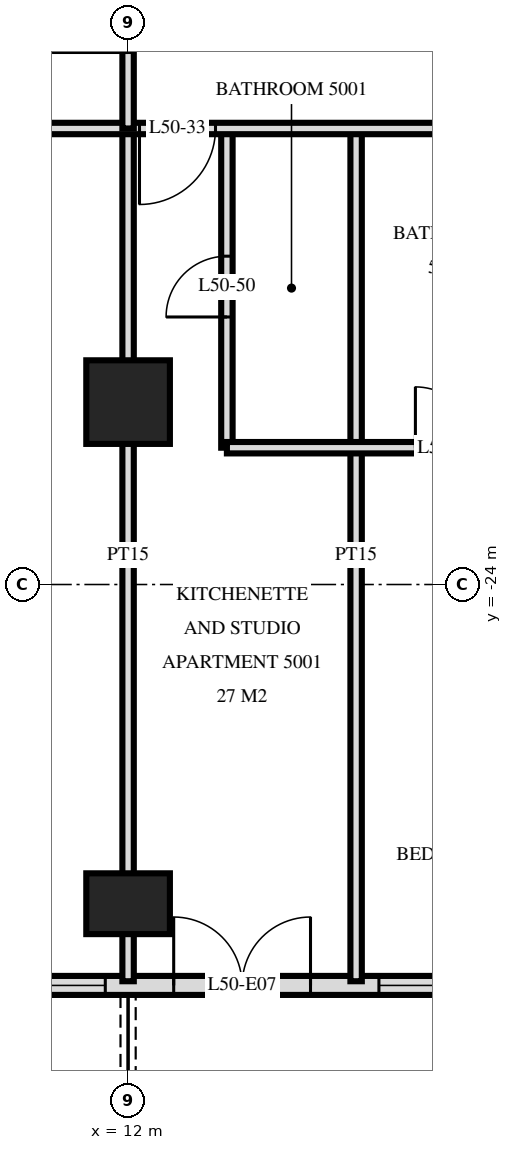
"""IFC4 building model, lengths in metres.
Left out: names, types, materials, properties, quantities, classifications, styles, units other than length and angle.
Written with IfcOpenShell. Run it as: python <this file> out.ifc"""

import sys

from ifc_helpers import new_model, si_unit, direction, frame, frame_2d, origin, origin_2d, place, context, subcontext, project, spatial, rectangle, extrude, element, fill, save


model = new_model("IFC4")
c1 = context("Model", 3, precision=1e-05, world=origin(), true_north=direction((0.0, 1.0)))
c2 = subcontext(c1, "Body", "Model", "MODEL_VIEW")
j1 = project(units=[si_unit("LENGTHUNIT", "METRE"), si_unit("PLANEANGLEUNIT", "RADIAN")], contexts=[c1])
p1 = place(None, origin())
s1 = spatial("IfcSite", under=j1, at=p1, CompositionType="ELEMENT")
p2 = place(p1, origin())
s2 = spatial("IfcBuilding", under=s1, at=p2, CompositionType="ELEMENT")
p3 = place(p2, frame((0.0, 0.0, 194.1)))
s3 = spatial("IfcBuildingStorey", under=s2, at=p3, CompositionType="ELEMENT", Elevation=194.1)
p4 = place(p3, frame((12.0, -28.2, 0.0), z_axis=(0.0, 0.0, 1.0), x_axis=(1.0, 0.0, 0.0)))
e1 = element("IfcColumn", 1, at=p4, inside=s3, PredefinedType="COLUMN", context=c2, shape_type="SweptSolid", body=[
    extrude(rectangle(XDim=1.1, YDim=0.8, at=origin_2d()), origin(), (0.0, 0.0, 1.0), 3.5),
])
p5 = place(p3, frame((12.0, -21.6, 0.0), z_axis=(0.0, 0.0, 1.0), x_axis=(1.0, 0.0, 0.0)))
e2 = element("IfcColumn", 2, at=p5, inside=s3, PredefinedType="COLUMN", context=c2, shape_type="SweptSolid", body=[
    extrude(rectangle(XDim=1.1, YDim=1.1, at=origin_2d()), origin(), (0.0, 0.0, 1.0), 3.5),
])
p6 = place(p3, frame((-22.475, -29.275, 0.0), z_axis=(0.0, 0.0, 1.0), x_axis=(1.0, 0.0, 0.0)))
e3 = element("IfcWall", 3, at=p6, inside=s3, PredefinedType="SOLIDWALL", context=c2, shape_type="SweptSolid", body=[
    extrude(rectangle(XDim=44.951, YDim=0.25, at=frame_2d((22.475, 0.0))), origin(), (0.0, 0.0, 1.0), 3.22),
])
p7 = place(p6, frame((0.575, 0.0, 0.0)))
e4 = element("IfcOpeningElement", 4, at=p7, cuts=e3, PredefinedType="OPENING", context=c2, shape_type="SweptSolid", body=[
    extrude(rectangle(XDim=1.8, YDim=2.4, at=frame_2d((0.9, 1.2))), frame((0.0, 0.135, 0.0), z_axis=(0.0, -1.0, 0.0), x_axis=(1.0, 0.0, 0.0)), (0.0, 0.0, 1.0), 0.27),
])
p8 = place(p6, frame((6.575, 0.0, 0.0)))
e5 = element("IfcOpeningElement", 5, at=p8, cuts=e3, PredefinedType="OPENING", context=c2, shape_type="SweptSolid", body=[
    extrude(rectangle(XDim=1.8, YDim=2.4, at=frame_2d((0.9, 1.2))), frame((0.0, 0.135, 0.0), z_axis=(0.0, -1.0, 0.0), x_axis=(1.0, 0.0, 0.0)), (0.0, 0.0, 1.0), 0.27),
])
p9 = place(p6, frame((11.075, 0.0, 0.0)))
e6 = element("IfcOpeningElement", 6, at=p9, cuts=e3, PredefinedType="OPENING", context=c2, shape_type="SweptSolid", body=[
    extrude(rectangle(XDim=1.8, YDim=2.4, at=frame_2d((0.9, 1.2))), frame((0.0, 0.135, 0.0), z_axis=(0.0, -1.0, 0.0), x_axis=(1.0, 0.0, 0.0)), (0.0, 0.0, 1.0), 0.27),
])
p10 = place(p6, frame((13.775, 0.0, 0.9)))
e7 = element("IfcOpeningElement", 7, at=p10, cuts=e3, PredefinedType="OPENING", context=c2, shape_type="SweptSolid", body=[
    extrude(rectangle(XDim=2.4, YDim=1.5, at=frame_2d((1.2, 0.75))), frame((0.0, 0.135, 0.0), z_axis=(0.0, -1.0, 0.0), x_axis=(1.0, 0.0, 0.0)), (0.0, 0.0, 1.0), 0.27),
])
p11 = place(p6, frame((16.775, 0.0, 0.9)))
e8 = element("IfcOpeningElement", 8, at=p11, cuts=e3, PredefinedType="OPENING", context=c2, shape_type="SweptSolid", body=[
    extrude(rectangle(XDim=2.4, YDim=1.5, at=frame_2d((1.2, 0.75))), frame((0.0, 0.135, 0.0), z_axis=(0.0, -1.0, 0.0), x_axis=(1.0, 0.0, 0.0)), (0.0, 0.0, 1.0), 0.27),
])
p12 = place(p6, frame((20.075, 0.0, 0.0)))
e9 = element("IfcOpeningElement", 9, at=p12, cuts=e3, PredefinedType="OPENING", context=c2, shape_type="SweptSolid", body=[
    extrude(rectangle(XDim=1.8, YDim=2.4, at=frame_2d((0.9, 1.2))), frame((0.0, 0.135, 0.0), z_axis=(0.0, -1.0, 0.0), x_axis=(1.0, 0.0, 0.0)), (0.0, 0.0, 1.0), 0.27),
])
p13 = place(p6, frame((23.075, 0.0, 0.0)))
e10 = element("IfcOpeningElement", 10, at=p13, cuts=e3, PredefinedType="OPENING", context=c2, shape_type="SweptSolid", body=[
    extrude(rectangle(XDim=1.8, YDim=2.4, at=frame_2d((0.9, 1.2))), frame((0.0, 0.135, 0.0), z_axis=(0.0, -1.0, 0.0), x_axis=(1.0, 0.0, 0.0)), (0.0, 0.0, 1.0), 0.27),
])
p14 = place(p6, frame((25.775, 0.0, 0.9)))
e11 = element("IfcOpeningElement", 11, at=p14, cuts=e3, PredefinedType="OPENING", context=c2, shape_type="SweptSolid", body=[
    extrude(rectangle(XDim=2.4, YDim=1.5, at=frame_2d((1.2, 0.75))), frame((0.0, 0.135, 0.0), z_axis=(0.0, -1.0, 0.0), x_axis=(1.0, 0.0, 0.0)), (0.0, 0.0, 1.0), 0.27),
])
p15 = place(p6, frame((29.075, 0.0, 0.0)))
e12 = element("IfcOpeningElement", 12, at=p15, cuts=e3, PredefinedType="OPENING", context=c2, shape_type="SweptSolid", body=[
    extrude(rectangle(XDim=1.8, YDim=2.4, at=frame_2d((0.9, 1.2))), frame((0.0, 0.135, 0.0), z_axis=(0.0, -1.0, 0.0), x_axis=(1.0, 0.0, 0.0)), (0.0, 0.0, 1.0), 0.27),
])
p16 = place(p6, frame((31.775, 0.0, 0.9)))
e13 = element("IfcOpeningElement", 13, at=p16, cuts=e3, PredefinedType="OPENING", context=c2, shape_type="SweptSolid", body=[
    extrude(rectangle(XDim=2.4, YDim=1.5, at=frame_2d((1.2, 0.75))), frame((0.0, 0.135, 0.0), z_axis=(0.0, -1.0, 0.0), x_axis=(1.0, 0.0, 0.0)), (0.0, 0.0, 1.0), 0.27),
])
p17 = place(p6, frame((35.075, 0.0, 0.0)))
e14 = element("IfcOpeningElement", 14, at=p17, cuts=e3, PredefinedType="OPENING", context=c2, shape_type="SweptSolid", body=[
    extrude(rectangle(XDim=1.8, YDim=2.4, at=frame_2d((0.9, 1.2))), frame((0.0, 0.135, 0.0), z_axis=(0.0, -1.0, 0.0), x_axis=(1.0, 0.0, 0.0)), (0.0, 0.0, 1.0), 0.27),
])
p18 = place(p6, frame((37.775, 0.0, 0.9)))
e15 = element("IfcOpeningElement", 15, at=p18, cuts=e3, PredefinedType="OPENING", context=c2, shape_type="SweptSolid", body=[
    extrude(rectangle(XDim=2.4, YDim=1.5, at=frame_2d((1.2, 0.75))), frame((0.0, 0.135, 0.0), z_axis=(0.0, -1.0, 0.0), x_axis=(1.0, 0.0, 0.0)), (0.0, 0.0, 1.0), 0.27),
])
p19 = place(p6, frame((41.075, 0.0, 0.0)))
e16 = element("IfcOpeningElement", 16, at=p19, cuts=e3, PredefinedType="OPENING", context=c2, shape_type="SweptSolid", body=[
    extrude(rectangle(XDim=1.8, YDim=2.4, at=frame_2d((0.9, 1.2))), frame((0.0, 0.135, 0.0), z_axis=(0.0, -1.0, 0.0), x_axis=(1.0, 0.0, 0.0)), (0.0, 0.0, 1.0), 0.27),
])
p20 = place(p3, frame((15.0, -29.22, 0.0), z_axis=(0.0, 0.0, 1.0), x_axis=(0.0, 1.0, 0.0)))
e17 = element("IfcWall", 17, at=p20, inside=s3, PredefinedType="PARTITIONING", context=c2, shape_type="SweptSolid", body=[
    extrude(rectangle(XDim=11.22, YDim=0.15, at=frame_2d((5.61, 0.0))), origin(), (0.0, 0.0, 1.0), 3.22),
])
p21 = place(p3, frame((13.3, -22.2, 0.0), z_axis=(0.0, 0.0, 1.0), x_axis=(0.0, 1.0, 0.0)))
e18 = element("IfcWall", 18, at=p21, inside=s3, PredefinedType="PARTITIONING", context=c2, shape_type="SweptSolid", body=[
    extrude(rectangle(XDim=4.2, YDim=0.15, at=frame_2d((2.1, 0.0))), origin(), (0.0, 0.0, 1.0), 3.22),
])
p22 = place(p21, frame((1.72, 0.0, 0.0)))
e19 = element("IfcOpeningElement", 19, at=p22, cuts=e18, PredefinedType="OPENING", context=c2, shape_type="SweptSolid", body=[
    extrude(rectangle(XDim=0.8, YDim=2.1, at=frame_2d((0.4, 1.05))), frame((0.0, 0.085, 0.0), z_axis=(0.0, -1.0, 0.0), x_axis=(1.0, 0.0, 0.0)), (0.0, 0.0, 1.0), 0.17),
])
p23 = place(p3, frame((12.0, -18.0, 0.0), z_axis=(0.0, 0.0, 1.0), x_axis=(0.0, 1.0, 0.0)))
e20 = element("IfcWall", 20, at=p23, inside=s3, PredefinedType="PARTITIONING", context=c2, shape_type="SweptSolid", body=[
    extrude(rectangle(XDim=2.95, YDim=0.15, at=frame_2d((1.475, 0.0))), origin(), (0.0, 0.0, 1.0), 3.22),
])
p24 = place(p23, frame((1.0, 0.0, 0.0)))
e21 = element("IfcOpeningElement", 21, at=p24, cuts=e20, PredefinedType="OPENING", context=c2, shape_type="SweptSolid", body=[
    extrude(rectangle(XDim=1.0, YDim=2.1, at=frame_2d((0.5, 1.05))), frame((0.0, 0.085, 0.0), z_axis=(0.0, -1.0, 0.0), x_axis=(1.0, 0.0, 0.0)), (0.0, 0.0, 1.0), 0.17),
])
p25 = place(p3, frame((12.0, -29.22, 0.0), z_axis=(0.0, 0.0, 1.0), x_axis=(0.0, 1.0, 0.0)))
e22 = element("IfcWall", 22, at=p25, inside=s3, PredefinedType="PARTITIONING", context=c2, shape_type="SweptSolid", body=[
    extrude(rectangle(XDim=11.22, YDim=0.15, at=frame_2d((5.61, 0.0))), origin(), (0.0, 0.0, 1.0), 3.22),
])
p26 = place(p3, frame((13.3, -22.2, 0.0), z_axis=(0.0, 0.0, 1.0), x_axis=(1.0, 0.0, 0.0)))
e23 = element("IfcWall", 23, at=p26, inside=s3, PredefinedType="PARTITIONING", context=c2, shape_type="SweptSolid", body=[
    extrude(rectangle(XDim=8.1, YDim=0.15, at=frame_2d((4.05, 0.0))), origin(), (0.0, 0.0, 1.0), 3.22),
])
p27 = place(p26, frame((2.48, 0.0, 0.0)))
e24 = element("IfcOpeningElement", 24, at=p27, cuts=e23, PredefinedType="OPENING", context=c2, shape_type="SweptSolid", body=[
    extrude(rectangle(XDim=0.8, YDim=2.1, at=frame_2d((0.4, 1.05))), frame((0.0, 0.085, 0.0), z_axis=(0.0, -1.0, 0.0), x_axis=(1.0, 0.0, 0.0)), (0.0, 0.0, 1.0), 0.17),
])
p28 = place(p26, frame((5.35, 0.0, 0.0)))
e25 = element("IfcOpeningElement", 25, at=p28, cuts=e23, PredefinedType="OPENING", context=c2, shape_type="SweptSolid", body=[
    extrude(rectangle(XDim=0.8, YDim=2.1, at=frame_2d((0.4, 1.05))), frame((0.0, 0.085, 0.0), z_axis=(0.0, -1.0, 0.0), x_axis=(1.0, 0.0, 0.0)), (0.0, 0.0, 1.0), 0.17),
])
p29 = place(p3, frame((-26.82, -18.0, 0.0), z_axis=(0.0, 0.0, 1.0), x_axis=(1.0, 0.0, 0.0)))
e26 = element("IfcWall", 26, at=p29, inside=s3, PredefinedType="PARTITIONING", context=c2, shape_type="SweptSolid", body=[
    extrude(rectangle(XDim=53.64, YDim=0.15, at=frame_2d((26.82, 0.0))), origin(), (0.0, 0.0, 1.0), 3.22),
])
p30 = place(p29, frame((11.32, 0.0, 0.0)))
e27 = element("IfcOpeningElement", 27, at=p30, cuts=e26, PredefinedType="OPENING", context=c2, shape_type="SweptSolid", body=[
    extrude(rectangle(XDim=1.0, YDim=2.1, at=frame_2d((0.5, 1.05))), frame((0.0, 0.085, 0.0), z_axis=(0.0, -1.0, 0.0), x_axis=(1.0, 0.0, 0.0)), (0.0, 0.0, 1.0), 0.17),
])
p31 = place(p29, frame((3.22, 0.0, 0.0)))
e28 = element("IfcOpeningElement", 28, at=p31, cuts=e26, PredefinedType="OPENING", context=c2, shape_type="SweptSolid", body=[
    extrude(rectangle(XDim=1.0, YDim=2.1, at=frame_2d((0.5, 1.05))), frame((0.0, 0.085, 0.0), z_axis=(0.0, -1.0, 0.0), x_axis=(1.0, 0.0, 0.0)), (0.0, 0.0, 1.0), 0.17),
])
p32 = place(p29, frame((5.02, 0.0, 0.0)))
e29 = element("IfcOpeningElement", 29, at=p32, cuts=e26, PredefinedType="OPENING", context=c2, shape_type="SweptSolid", body=[
    extrude(rectangle(XDim=1.0, YDim=2.1, at=frame_2d((0.5, 1.05))), frame((0.0, 0.085, 0.0), z_axis=(0.0, -1.0, 0.0), x_axis=(1.0, 0.0, 0.0)), (0.0, 0.0, 1.0), 0.17),
])
p33 = place(p29, frame((38.97, 0.0, 0.0)))
e30 = element("IfcOpeningElement", 30, at=p33, cuts=e26, PredefinedType="OPENING", context=c2, shape_type="SweptSolid", body=[
    extrude(rectangle(XDim=1.0, YDim=2.1, at=frame_2d((0.5, 1.05))), frame((0.0, 0.085, 0.0), z_axis=(0.0, -1.0, 0.0), x_axis=(1.0, 0.0, 0.0)), (0.0, 0.0, 1.0), 0.17),
])
p34 = place(p29, frame((48.72, 0.0, 0.0)))
e31 = element("IfcOpeningElement", 31, at=p34, cuts=e26, PredefinedType="OPENING", context=c2, shape_type="SweptSolid", body=[
    extrude(rectangle(XDim=1.0, YDim=2.1, at=frame_2d((0.5, 1.05))), frame((0.0, 0.085, 0.0), z_axis=(0.0, -1.0, 0.0), x_axis=(1.0, 0.0, 0.0)), (0.0, 0.0, 1.0), 0.17),
])
p35 = place(p29, frame((46.92, 0.0, 0.0)))
e32 = element("IfcOpeningElement", 32, at=p35, cuts=e26, PredefinedType="OPENING", context=c2, shape_type="SweptSolid", body=[
    extrude(rectangle(XDim=1.0, YDim=2.1, at=frame_2d((0.5, 1.05))), frame((0.0, 0.085, 0.0), z_axis=(0.0, -1.0, 0.0), x_axis=(1.0, 0.0, 0.0)), (0.0, 0.0, 1.0), 0.17),
])
p36 = place(p29, frame((17.32, 0.0, 0.0)))
e33 = element("IfcOpeningElement", 33, at=p36, cuts=e26, PredefinedType="OPENING", context=c2, shape_type="SweptSolid", body=[
    extrude(rectangle(XDim=1.0, YDim=2.1, at=frame_2d((0.5, 1.05))), frame((0.0, 0.085, 0.0), z_axis=(0.0, -1.0, 0.0), x_axis=(1.0, 0.0, 0.0)), (0.0, 0.0, 1.0), 0.17),
])
p37 = place(p29, frame((23.32, 0.0, 0.0)))
e34 = element("IfcOpeningElement", 34, at=p37, cuts=e26, PredefinedType="OPENING", context=c2, shape_type="SweptSolid", body=[
    extrude(rectangle(XDim=1.0, YDim=2.1, at=frame_2d((0.5, 1.05))), frame((0.0, 0.085, 0.0), z_axis=(0.0, -1.0, 0.0), x_axis=(1.0, 0.0, 0.0)), (0.0, 0.0, 1.0), 0.17),
])
p38 = place(p29, frame((29.32, 0.0, 0.0)))
e35 = element("IfcOpeningElement", 35, at=p38, cuts=e26, PredefinedType="OPENING", context=c2, shape_type="SweptSolid", body=[
    extrude(rectangle(XDim=1.0, YDim=2.1, at=frame_2d((0.5, 1.05))), frame((0.0, 0.085, 0.0), z_axis=(0.0, -1.0, 0.0), x_axis=(1.0, 0.0, 0.0)), (0.0, 0.0, 1.0), 0.17),
])
p39 = place(p29, frame((35.32, 0.0, 0.0)))
e36 = element("IfcOpeningElement", 36, at=p39, cuts=e26, PredefinedType="OPENING", context=c2, shape_type="SweptSolid", body=[
    extrude(rectangle(XDim=1.0, YDim=2.1, at=frame_2d((0.5, 1.05))), frame((0.0, 0.085, 0.0), z_axis=(0.0, -1.0, 0.0), x_axis=(1.0, 0.0, 0.0)), (0.0, 0.0, 1.0), 0.17),
])
p40 = place(p16, origin())
e37 = element("IfcWindow", 37, at=p40, inside=s3, PartitioningType="SINGLE_PANEL", PredefinedType="WINDOW", context=c2, shape_type="SweptSolid", body=[
    extrude(rectangle(XDim=2.4, YDim=1.5, at=frame_2d((1.2, 0.75))), frame((0.0, 0.03, 0.0), z_axis=(0.0, -1.0, 0.0), x_axis=(1.0, 0.0, 0.0)), (0.0, 0.0, 1.0), 0.06),
])
fill(e13, e37)
p41 = place(p17, origin())
e38 = element("IfcDoor", 38, at=p41, inside=s3, OperationType="DOUBLE_DOOR_SINGLE_SWING", PredefinedType="DOOR", context=c2, shape_type="SweptSolid", body=[
    extrude(rectangle(XDim=1.8, YDim=2.4, at=frame_2d((0.9, 1.2))), frame((0.0, 0.025, 0.0), z_axis=(0.0, -1.0, 0.0), x_axis=(1.0, 0.0, 0.0)), (0.0, 0.0, 1.0), 0.05),
])
fill(e14, e38)
p42 = place(p18, origin())
e39 = element("IfcWindow", 39, at=p42, inside=s3, PartitioningType="SINGLE_PANEL", PredefinedType="WINDOW", context=c2, shape_type="SweptSolid", body=[
    extrude(rectangle(XDim=2.4, YDim=1.5, at=frame_2d((1.2, 0.75))), frame((0.0, 0.03, 0.0), z_axis=(0.0, -1.0, 0.0), x_axis=(1.0, 0.0, 0.0)), (0.0, 0.0, 1.0), 0.06),
])
fill(e15, e39)
p43 = place(p33, frame((0.5, 0.0, 0.0), z_axis=(0.0, 0.0, 1.0), x_axis=(-1.0, 0.0, 0.0)))
e40 = element("IfcDoor", 40, at=p43, inside=s3, OperationType="SINGLE_SWING_LEFT", PredefinedType="DOOR", context=c2, shape_type="SweptSolid", body=[
    extrude(rectangle(XDim=1.0, YDim=2.1, at=frame_2d((0.0, 1.05))), frame((0.0, -0.025, 0.0), z_axis=(0.0, 1.0, 0.0), x_axis=(-1.0, 0.0, 0.0)), (0.0, 0.0, 1.0), 0.05),
])
fill(e30, e40)
p44 = place(p22, origin())
e41 = element("IfcDoor", 41, at=p44, inside=s3, OperationType="SINGLE_SWING_RIGHT", PredefinedType="DOOR", context=c2, shape_type="SweptSolid", body=[
    extrude(rectangle(XDim=0.8, YDim=2.1, at=frame_2d((0.4, 1.05))), frame((0.0, 0.025, 0.0), z_axis=(0.0, -1.0, 0.0), x_axis=(1.0, 0.0, 0.0)), (0.0, 0.0, 1.0), 0.05),
])
fill(e19, e41)
p45 = place(p27, origin())
e42 = element("IfcDoor", 42, at=p45, inside=s3, OperationType="SINGLE_SWING_RIGHT", PredefinedType="DOOR", context=c2, shape_type="SweptSolid", body=[
    extrude(rectangle(XDim=0.8, YDim=2.1, at=frame_2d((0.4, 1.05))), frame((0.0, 0.025, 0.0), z_axis=(0.0, -1.0, 0.0), x_axis=(1.0, 0.0, 0.0)), (0.0, 0.0, 1.0), 0.05),
])
fill(e24, e42)
save(model, sys.argv[1])
